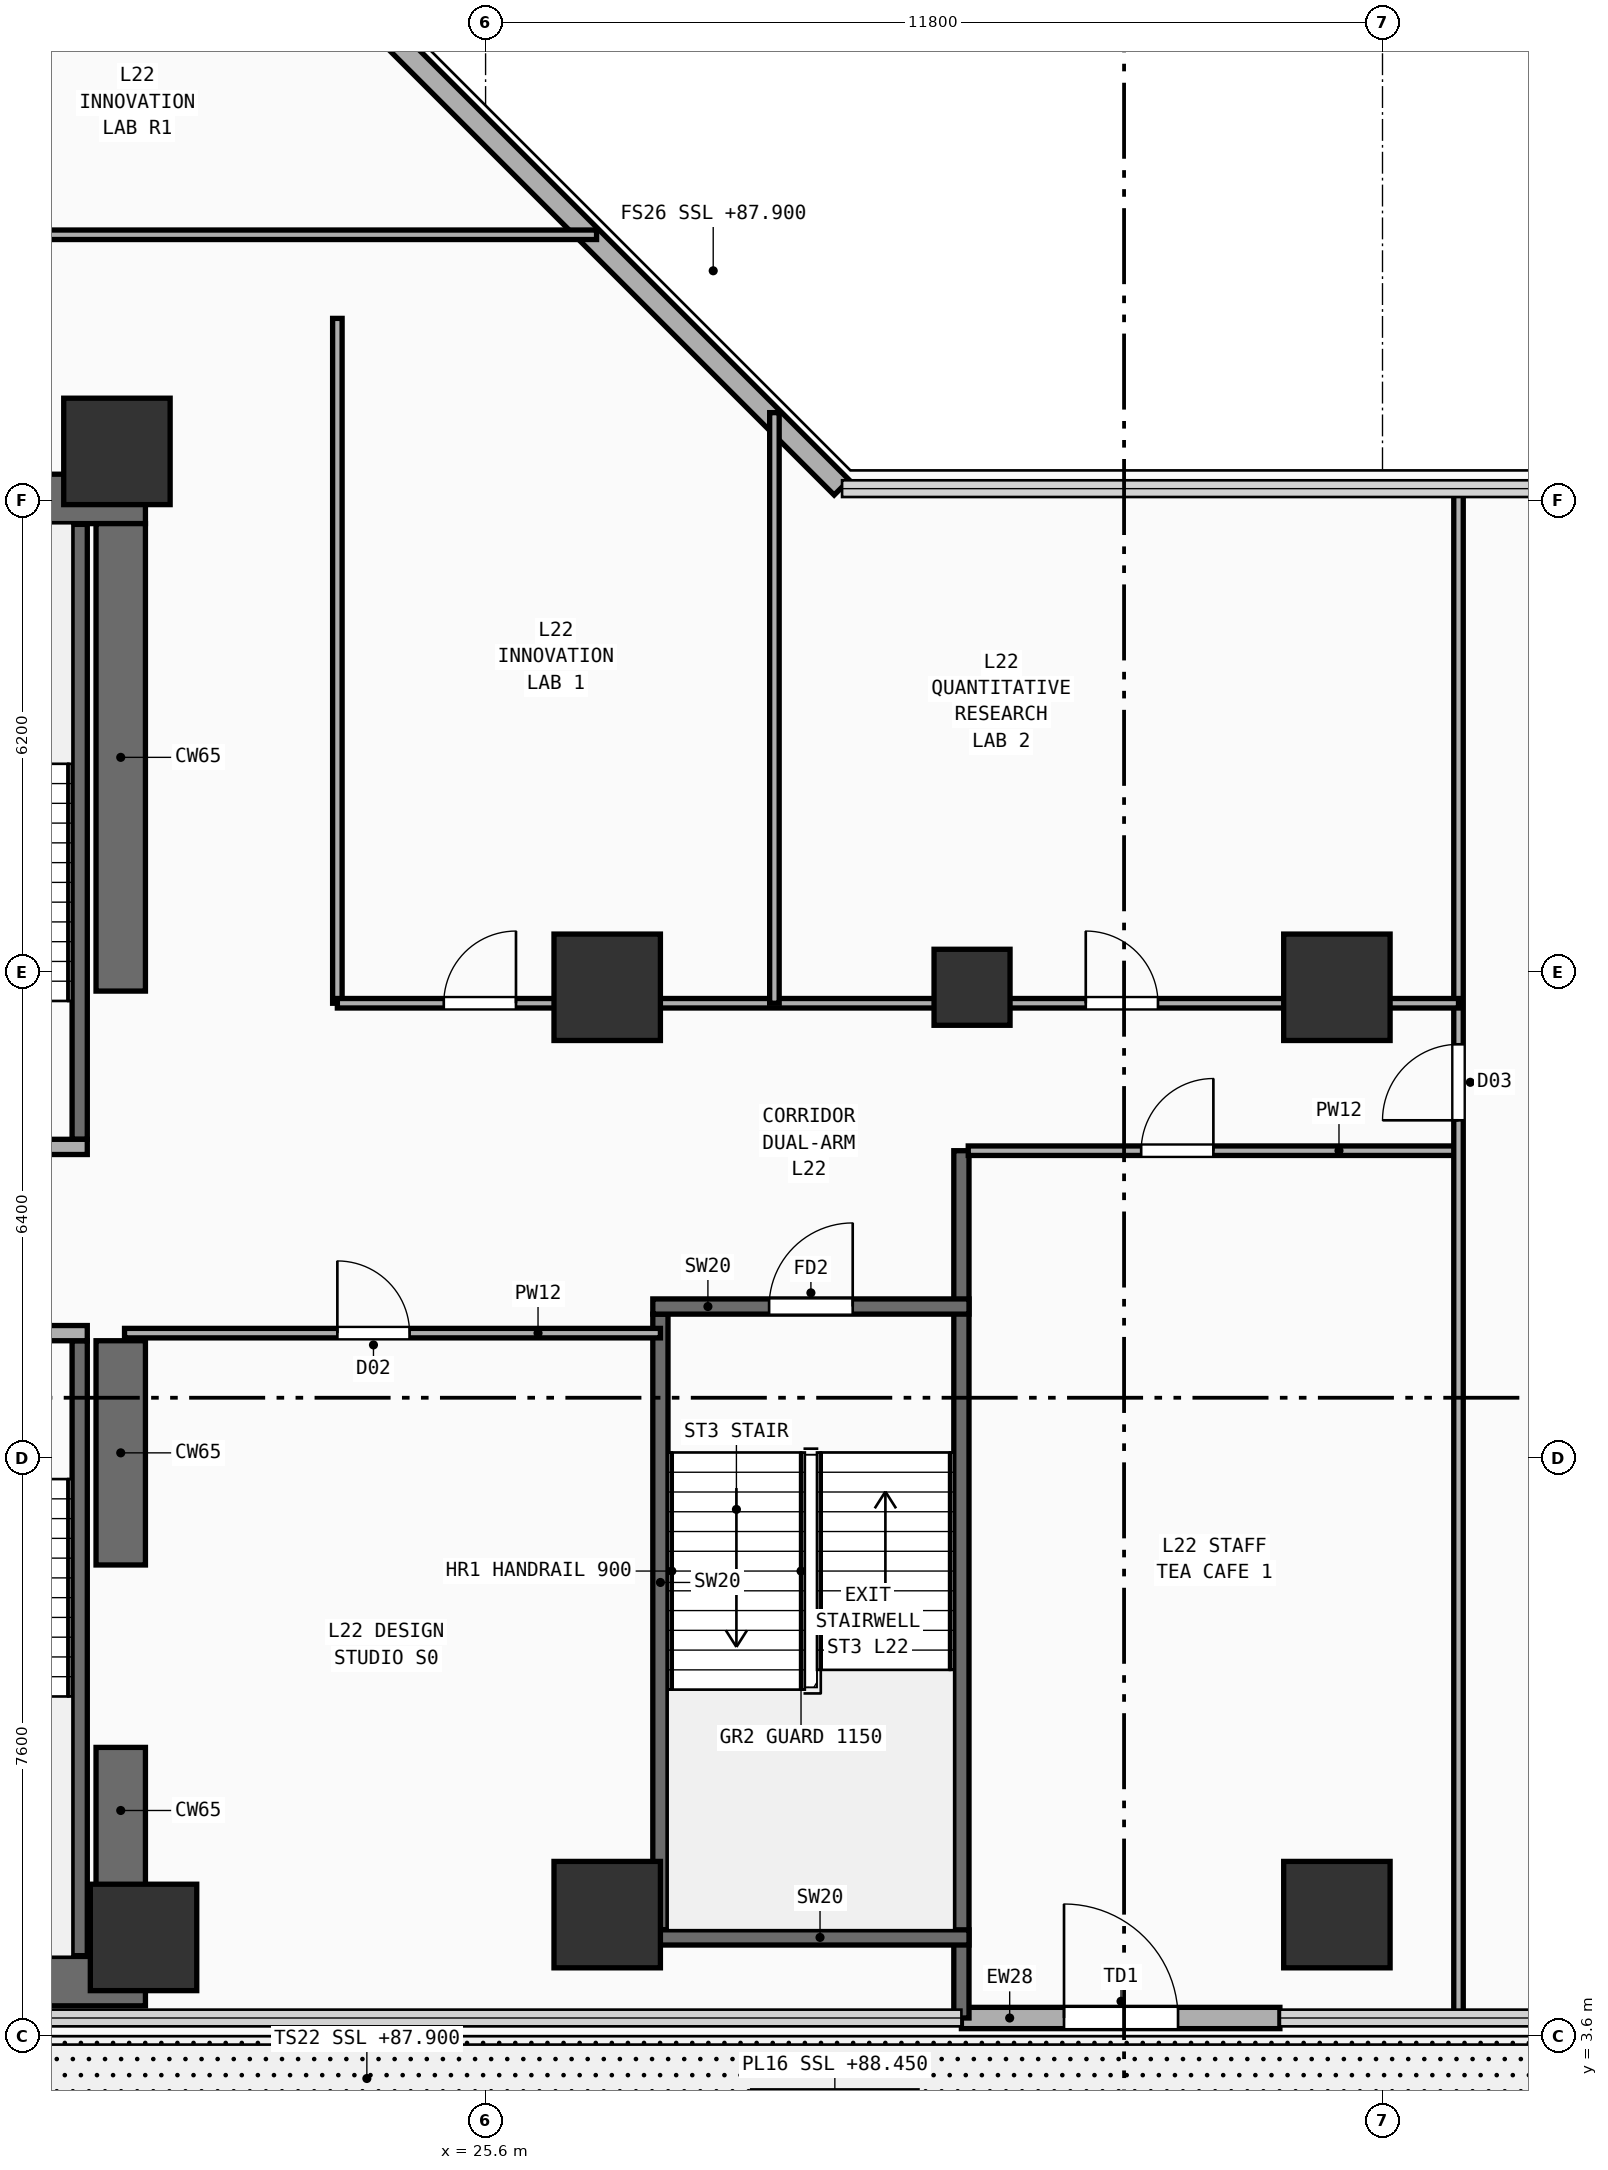
"""IFC4 building model, lengths in metres.
Left out: names, types, materials, properties, quantities, classifications, styles, units other than length and angle.
Written with IfcOpenShell. Run it as: python <this file> out.ifc"""

import sys

from ifc_helpers import new_model, si_unit, direction, frame, frame_2d, origin, origin_2d, place, context, subcontext, project, spatial, rectangle, extrude, element, fill, save


model = new_model("IFC4")
c1 = context("Model", 3, precision=1e-05, world=origin(), true_north=direction((0.0, 1.0)))
c2 = subcontext(c1, "Body", "Model", "MODEL_VIEW")
j1 = project(units=[si_unit("LENGTHUNIT", "METRE"), si_unit("PLANEANGLEUNIT", "RADIAN")], contexts=[c1])
p1 = place(None, origin())
s1 = spatial("IfcSite", under=j1, at=p1, CompositionType="ELEMENT")
p2 = place(p1, origin())
s2 = spatial("IfcBuilding", under=s1, at=p2, CompositionType="ELEMENT")
p3 = place(p2, frame((0.0, 0.0, 87.9)))
s3 = spatial("IfcBuildingStorey", under=s2, at=p3, CompositionType="ELEMENT", Elevation=87.9)
for number, where, z_axis, x_axis in (
    (1, (7.125, 4.325, 0.0), (0.0, 0.0, 1.0), (1.0, 0.0, 0.0)),
    (2, (7.125, 23.825, 0.0), (0.0, 0.0, 1.0), (1.0, 0.0, 0.0)),
):
    element("IfcWall", number, at=place(p3, frame(where, z_axis=z_axis, x_axis=x_axis)), inside=s3, PredefinedType="SHEAR", context=c2, shape_type="SweptSolid", body=[
        extrude(rectangle(XDim=14.0, YDim=0.65, at=frame_2d((7.0, 0.0))), origin(), (0.0, 0.0, 1.0), 3.54),
    ])
p4 = place(p3, frame((20.8, 4.65, 0.0), z_axis=(0.0, 0.0, 1.0), x_axis=(0.0, 1.0, 0.0)))
e3 = element("IfcWall", 3, at=p4, inside=s3, PredefinedType="SHEAR", context=c2, shape_type="SweptSolid", body=[
    extrude(rectangle(XDim=2.75, YDim=0.65, at=frame_2d((1.375, 0.0))), origin(), (0.0, 0.0, 1.0), 3.54),
])
p5 = place(p3, frame((20.8, 9.8, 0.0), z_axis=(0.0, 0.0, 1.0), x_axis=(0.0, 1.0, 0.0)))
e4 = element("IfcWall", 4, at=p5, inside=s3, PredefinedType="SHEAR", context=c2, shape_type="SweptSolid", body=[
    extrude(rectangle(XDim=2.95, YDim=0.65, at=frame_2d((1.475, 0.0))), origin(), (0.0, 0.0, 1.0), 3.54),
])
p6 = place(p3, frame((20.8, 17.35, 0.0), z_axis=(0.0, 0.0, 1.0), x_axis=(0.0, 1.0, 0.0)))
e5 = element("IfcWall", 5, at=p6, inside=s3, PredefinedType="SHEAR", context=c2, shape_type="SweptSolid", body=[
    extrude(rectangle(XDim=6.15, YDim=0.65, at=frame_2d((3.075, 0.0))), origin(), (0.0, 0.0, 1.0), 3.54),
])
for number, where, z_axis, x_axis in (
    (6, (21.1, 4.9, 0.0), (0.0, 0.0, 1.0), (1.0, 0.0, 0.0)),
    (7, (20.75, 24.45, 0.0), (0.0, 0.0, 1.0), (1.0, 0.0, 0.0)),
    (8, (27.2, 5.2, 0.0), (0.0, 0.0, 1.0), (1.0, 0.0, 0.0)),
    (9, (36.8, 5.2, 0.0), (0.0, 0.0, 1.0), (1.0, 0.0, 0.0)),
    (10, (27.2, 17.4, 0.0), (0.0, 0.0, 1.0), (1.0, 0.0, 0.0)),
    (11, (36.8, 17.4, 0.0), (0.0, 0.0, 1.0), (1.0, 0.0, 0.0)),
):
    element("IfcColumn", number, at=place(p3, frame(where, z_axis=z_axis, x_axis=x_axis)), inside=s3, PredefinedType="COLUMN", context=c2, shape_type="SweptSolid", body=[
        extrude(rectangle(XDim=1.4, YDim=1.4, at=origin_2d()), origin(), (0.0, 0.0, 1.0), 3.54),
    ])
p7 = place(p3, frame((32.0, 17.4, 0.0), z_axis=(0.0, 0.0, 1.0), x_axis=(1.0, 0.0, 0.0)))
e12 = element("IfcColumn", 12, at=p7, inside=s3, PredefinedType="COLUMN", context=c2, shape_type="SweptSolid", body=[
    extrude(rectangle(XDim=1.0, YDim=1.0, at=origin_2d()), origin(), (0.0, 0.0, 1.0), 3.54),
])
p8 = place(p3, frame((31.86, 3.84, 0.0), z_axis=(0.0, 0.0, 1.0), x_axis=(1.0, 0.0, 0.0)))
e13 = element("IfcWall", 13, at=p8, inside=s3, PredefinedType="SOLIDWALL", context=c2, shape_type="SweptSolid", body=[
    extrude(rectangle(XDim=4.19, YDim=0.28, at=frame_2d((2.095, 0.0))), origin(), (0.0, 0.0, 1.0), 3.54),
])
p9 = place(p8, frame((1.35, 0.0, 0.0)))
e14 = element("IfcOpeningElement", 14, at=p9, cuts=e13, PredefinedType="OPENING", context=c2, shape_type="SweptSolid", body=[
    extrude(rectangle(XDim=1.5, YDim=2.25, at=frame_2d((0.75, 1.125))), frame((0.0, 0.15, 0.0), z_axis=(0.0, -1.0, 0.0), x_axis=(1.0, 0.0, 0.0)), (0.0, 0.0, 1.0), 0.3),
])
p10 = place(p3, frame((30.285, 23.975, 0.0), z_axis=(0.0, 0.0, 1.0), x_axis=(-0.707106781187, 0.707106781187, 0.0)))
e15 = element("IfcWall", 15, at=p10, inside=s3, PredefinedType="SOLIDWALL", context=c2, shape_type="SweptSolid", body=[
    extrude(rectangle(XDim=9.207, YDim=0.28, at=frame_2d((4.603, 0.0))), origin(), (0.0, 0.0, 1.0), 3.54),
])
p11 = place(p3, frame((20.26, 4.66, 0.0), z_axis=(0.0, 0.0, 1.0), x_axis=(0.0, 1.0, 0.0)))
e16 = element("IfcWall", 16, at=p11, inside=s3, PredefinedType="SHEAR", context=c2, shape_type="SweptSolid", body=[
    extrude(rectangle(XDim=8.09, YDim=0.2, at=frame_2d((4.045, 0.0))), origin(), (0.0, 0.0, 1.0), 3.54),
])
p12 = place(p3, frame((16.4, 12.85, 0.0), z_axis=(0.0, 0.0, 1.0), x_axis=(1.0, 0.0, 0.0)))
e17 = element("IfcWall", 17, at=p12, inside=s3, PredefinedType="PARTITIONING", context=c2, shape_type="SweptSolid", body=[
    extrude(rectangle(XDim=3.96, YDim=0.2, at=frame_2d((1.98, 0.0))), origin(), (0.0, 0.0, 1.0), 3.54),
])
p13 = place(p12, frame((1.304, 0.0, 0.0)))
e18 = element("IfcOpeningElement", 18, at=p13, cuts=e17, PredefinedType="OPENING", context=c2, shape_type="SweptSolid", body=[
    extrude(rectangle(XDim=1.1, YDim=2.2, at=frame_2d((0.55, 1.1))), frame((0.0, 0.11, 0.0), z_axis=(0.0, -1.0, 0.0), x_axis=(1.0, 0.0, 0.0)), (0.0, 0.0, 1.0), 0.22),
])
p14 = place(p3, frame((20.26, 15.4, 0.0), z_axis=(0.0, 0.0, 1.0), x_axis=(0.0, 1.0, 0.0)))
e19 = element("IfcWall", 19, at=p14, inside=s3, PredefinedType="SHEAR", context=c2, shape_type="SweptSolid", body=[
    extrude(rectangle(XDim=8.09, YDim=0.2, at=frame_2d((4.045, 0.0))), origin(), (0.0, 0.0, 1.0), 3.54),
])
p15 = place(p3, frame((16.41, 15.3, 0.0), z_axis=(0.0, 0.0, 1.0), x_axis=(1.0, 0.0, 0.0)))
e20 = element("IfcWall", 20, at=p15, inside=s3, PredefinedType="PARTITIONING", context=c2, shape_type="SweptSolid", body=[
    extrude(rectangle(XDim=3.95, YDim=0.2, at=frame_2d((1.975, 0.0))), origin(), (0.0, 0.0, 1.0), 3.54),
])
p16 = place(p15, frame((1.294, 0.0, 0.0)))
e21 = element("IfcOpeningElement", 21, at=p16, cuts=e20, PredefinedType="OPENING", context=c2, shape_type="SweptSolid", body=[
    extrude(rectangle(XDim=1.1, YDim=2.2, at=frame_2d((0.55, 1.1))), frame((0.0, 0.11, 0.0), z_axis=(0.0, -1.0, 0.0), x_axis=(1.0, 0.0, 0.0)), (0.0, 0.0, 1.0), 0.22),
])
p17 = place(p3, frame((27.9, 5.0, 0.0), z_axis=(0.0, 0.0, 1.0), x_axis=(0.0, 1.0, 0.0)))
e22 = element("IfcWall", 22, at=p17, inside=s3, PredefinedType="SHEAR", context=c2, shape_type="SweptSolid", body=[
    extrude(rectangle(XDim=8.1, YDim=0.2, at=frame_2d((4.05, 0.0))), origin(), (0.0, 0.0, 1.0), 3.54),
])
p18 = place(p3, frame((31.86, 3.84, 0.0), z_axis=(0.0, 0.0, 1.0), x_axis=(0.0, 1.0, 0.0)))
e23 = element("IfcWall", 23, at=p18, inside=s3, PredefinedType="SHEAR", context=c2, shape_type="SweptSolid", body=[
    extrude(rectangle(XDim=11.41, YDim=0.2, at=frame_2d((5.705, 0.0))), origin(), (0.0, 0.0, 1.0), 3.54),
])
p19 = place(p3, frame((27.8, 4.9, 0.0), z_axis=(0.0, 0.0, 1.0), x_axis=(1.0, 0.0, 0.0)))
e24 = element("IfcWall", 24, at=p19, inside=s3, PredefinedType="SHEAR", context=c2, shape_type="SweptSolid", body=[
    extrude(rectangle(XDim=4.16, YDim=0.2, at=frame_2d((2.08, 0.0))), origin(), (0.0, 0.0, 1.0), 3.54),
])
p20 = place(p3, frame((27.8, 13.2, 0.0), z_axis=(0.0, 0.0, 1.0), x_axis=(1.0, 0.0, 0.0)))
e25 = element("IfcWall", 25, at=p20, inside=s3, PredefinedType="SHEAR", context=c2, shape_type="SweptSolid", body=[
    extrude(rectangle(XDim=4.16, YDim=0.2, at=frame_2d((2.08, 0.0))), origin(), (0.0, 0.0, 1.0), 3.54),
])
p21 = place(p20, frame((1.53, 0.0, 0.0)))
e26 = element("IfcOpeningElement", 26, at=p21, cuts=e25, PredefinedType="OPENING", context=c2, shape_type="SweptSolid", body=[
    extrude(rectangle(XDim=1.1, YDim=2.2, at=frame_2d((0.55, 1.1))), frame((0.0, 0.11, 0.0), z_axis=(0.0, -1.0, 0.0), x_axis=(1.0, 0.0, 0.0)), (0.0, 0.0, 1.0), 0.22),
])
p22 = place(p3, frame((20.85, 12.85, 0.0), z_axis=(0.0, 0.0, 1.0), x_axis=(1.0, 0.0, 0.0)))
e27 = element("IfcWall", 27, at=p22, inside=s3, PredefinedType="PARTITIONING", context=c2, shape_type="SweptSolid", body=[
    extrude(rectangle(XDim=7.05, YDim=0.125, at=frame_2d((3.525, 0.0))), origin(), (0.0, 0.0, 1.0), 3.54),
])
p23 = place(p22, frame((2.8, 0.0, 0.0)))
e28 = element("IfcOpeningElement", 28, at=p23, cuts=e27, PredefinedType="OPENING", context=c2, shape_type="SweptSolid", body=[
    extrude(rectangle(XDim=0.95, YDim=2.15, at=frame_2d((0.475, 1.075))), frame((0.0, 0.073, 0.0), z_axis=(0.0, -1.0, 0.0), x_axis=(1.0, 0.0, 0.0)), (0.0, 0.0, 1.0), 0.145),
])
p24 = place(p3, frame((31.95, 15.25, 0.0), z_axis=(0.0, 0.0, 1.0), x_axis=(1.0, 0.0, 0.0)))
e29 = element("IfcWall", 29, at=p24, inside=s3, PredefinedType="PARTITIONING", context=c2, shape_type="SweptSolid", body=[
    extrude(rectangle(XDim=6.45, YDim=0.125, at=frame_2d((3.225, 0.0))), origin(), (0.0, 0.0, 1.0), 3.09),
])
p25 = place(p24, frame((2.275, 0.0, 0.0)))
e30 = element("IfcOpeningElement", 30, at=p25, cuts=e29, PredefinedType="OPENING", context=c2, shape_type="SweptSolid", body=[
    extrude(rectangle(XDim=0.95, YDim=2.15, at=frame_2d((0.475, 1.075))), frame((0.0, 0.073, 0.0), z_axis=(0.0, -1.0, 0.0), x_axis=(1.0, 0.0, 0.0)), (0.0, 0.0, 1.0), 0.145),
])
p26 = place(p3, frame((38.4, 3.84, 0.0), z_axis=(0.0, 0.0, 1.0), x_axis=(0.0, 1.0, 0.0)))
e31 = element("IfcWall", 31, at=p26, inside=s3, PredefinedType="PARTITIONING", context=c2, shape_type="SweptSolid", body=[
    extrude(rectangle(XDim=20.12, YDim=0.125, at=frame_2d((10.06, 0.0))), origin(), (0.0, 0.0, 1.0), 3.54),
])
p27 = place(p26, frame((11.81, 0.0, 0.0)))
e32 = element("IfcOpeningElement", 32, at=p27, cuts=e31, PredefinedType="OPENING", context=c2, shape_type="SweptSolid", body=[
    extrude(rectangle(XDim=1.0, YDim=2.2, at=frame_2d((0.5, 1.1))), frame((0.0, 0.073, 0.0), z_axis=(0.0, -1.0, 0.0), x_axis=(1.0, 0.0, 0.0)), (0.0, 0.0, 1.0), 0.145),
])
p28 = place(p3, frame((23.65, 17.19, 0.0), z_axis=(0.0, 0.0, 1.0), x_axis=(0.0, 1.0, 0.0)))
e33 = element("IfcWall", 33, at=p28, inside=s3, PredefinedType="PARTITIONING", context=c2, shape_type="SweptSolid", body=[
    extrude(rectangle(XDim=9.01, YDim=0.125, at=frame_2d((4.505, 0.0))), origin(), (0.0, 0.0, 1.0), 3.54),
])
p29 = place(p3, frame((23.65, 17.19, 0.0), z_axis=(0.0, 0.0, 1.0), x_axis=(1.0, 0.0, 0.0)))
e34 = element("IfcWall", 34, at=p29, inside=s3, PredefinedType="PARTITIONING", context=c2, shape_type="SweptSolid", body=[
    extrude(rectangle(XDim=14.75, YDim=0.125, at=frame_2d((7.375, 0.0))), origin(), (0.0, 0.0, 1.0), 3.24),
])
p30 = place(p29, frame((1.4, 0.0, 0.0)))
e35 = element("IfcOpeningElement", 35, at=p30, cuts=e34, PredefinedType="OPENING", context=c2, shape_type="SweptSolid", body=[
    extrude(rectangle(XDim=0.95, YDim=2.15, at=frame_2d((0.475, 1.075))), frame((0.0, 0.073, 0.0), z_axis=(0.0, -1.0, 0.0), x_axis=(1.0, 0.0, 0.0)), (0.0, 0.0, 1.0), 0.145),
])
p31 = place(p29, frame((9.846, 0.0, 0.0)))
e36 = element("IfcOpeningElement", 36, at=p31, cuts=e34, PredefinedType="OPENING", context=c2, shape_type="SweptSolid", body=[
    extrude(rectangle(XDim=0.95, YDim=2.15, at=frame_2d((0.475, 1.075))), frame((0.0, 0.073, 0.0), z_axis=(0.0, -1.0, 0.0), x_axis=(1.0, 0.0, 0.0)), (0.0, 0.0, 1.0), 0.145),
])
p32 = place(p3, frame((29.4, 17.19, 0.0), z_axis=(0.0, 0.0, 1.0), x_axis=(0.0, 1.0, 0.0)))
e37 = element("IfcWall", 37, at=p32, inside=s3, PredefinedType="PARTITIONING", context=c2, shape_type="SweptSolid", body=[
    extrude(rectangle(XDim=7.77, YDim=0.125, at=frame_2d((3.885, 0.0))), origin(), (0.0, 0.0, 1.0), 3.54),
])
p33 = place(p3, frame((15.54, 27.3, 0.0), z_axis=(0.0, 0.0, 1.0), x_axis=(1.0, 0.0, 0.0)))
e38 = element("IfcWall", 38, at=p33, inside=s3, PredefinedType="PARTITIONING", context=c2, shape_type="SweptSolid", body=[
    extrude(rectangle(XDim=11.52, YDim=0.125, at=frame_2d((5.76, 0.0))), origin(), (0.0, 0.0, 1.0), 3.54),
])
p34 = place(p9, frame((1.5, 0.0, 0.0), z_axis=(0.0, 0.0, 1.0), x_axis=(-1.0, 0.0, 0.0)))
e39 = element("IfcDoor", 39, at=p34, inside=s3, OperationType="SINGLE_SWING_RIGHT", PredefinedType="DOOR", context=c2, shape_type="SweptSolid", body=[
    extrude(rectangle(XDim=1.5, YDim=2.25, at=frame_2d((0.75, 1.125))), frame((0.0, 0.025, 0.0), z_axis=(0.0, -1.0, 0.0), x_axis=(1.0, 0.0, 0.0)), (0.0, 0.0, 1.0), 0.05),
])
fill(e14, e39)
p35 = place(p21, frame((1.1, 0.0, 0.0), z_axis=(0.0, 0.0, 1.0), x_axis=(-1.0, 0.0, 0.0)))
e40 = element("IfcDoor", 40, at=p35, inside=s3, OperationType="SINGLE_SWING_LEFT", PredefinedType="DOOR", context=c2, shape_type="SweptSolid", body=[
    extrude(rectangle(XDim=1.1, YDim=2.2, at=frame_2d((0.55, 1.1))), frame((0.0, 0.025, 0.0), z_axis=(0.0, -1.0, 0.0), x_axis=(1.0, 0.0, 0.0)), (0.0, 0.0, 1.0), 0.05),
])
fill(e26, e40)
p36 = place(p23, origin())
e41 = element("IfcDoor", 41, at=p36, inside=s3, OperationType="SINGLE_SWING_LEFT", PredefinedType="DOOR", context=c2, shape_type="SweptSolid", body=[
    extrude(rectangle(XDim=0.95, YDim=2.15, at=frame_2d((0.475, 1.075))), frame((0.0, 0.025, 0.0), z_axis=(0.0, -1.0, 0.0), x_axis=(1.0, 0.0, 0.0)), (0.0, 0.0, 1.0), 0.05),
])
fill(e28, e41)
p37 = place(p25, origin())
e42 = element("IfcDoor", 42, at=p37, inside=s3, OperationType="SINGLE_SWING_RIGHT", PredefinedType="DOOR", context=c2, shape_type="SweptSolid", body=[
    extrude(rectangle(XDim=0.95, YDim=2.15, at=frame_2d((0.475, 1.075))), frame((0.0, 0.025, 0.0), z_axis=(0.0, -1.0, 0.0), x_axis=(1.0, 0.0, 0.0)), (0.0, 0.0, 1.0), 0.05),
])
fill(e30, e42)
p38 = place(p27, origin())
e43 = element("IfcDoor", 43, at=p38, inside=s3, OperationType="SINGLE_SWING_LEFT", PredefinedType="DOOR", context=c2, shape_type="SweptSolid", body=[
    extrude(rectangle(XDim=1.0, YDim=2.2, at=frame_2d((0.5, 1.1))), frame((0.0, 0.025, 0.0), z_axis=(0.0, -1.0, 0.0), x_axis=(1.0, 0.0, 0.0)), (0.0, 0.0, 1.0), 0.05),
])
fill(e32, e43)
p39 = place(p30, origin())
e44 = element("IfcDoor", 44, at=p39, inside=s3, OperationType="SINGLE_SWING_RIGHT", PredefinedType="DOOR", context=c2, shape_type="SweptSolid", body=[
    extrude(rectangle(XDim=0.95, YDim=2.15, at=frame_2d((0.475, 1.075))), frame((0.0, 0.025, 0.0), z_axis=(0.0, -1.0, 0.0), x_axis=(1.0, 0.0, 0.0)), (0.0, 0.0, 1.0), 0.05),
])
fill(e35, e44)
p40 = place(p31, origin())
e45 = element("IfcDoor", 45, at=p40, inside=s3, OperationType="SINGLE_SWING_LEFT", PredefinedType="DOOR", context=c2, shape_type="SweptSolid", body=[
    extrude(rectangle(XDim=0.95, YDim=2.15, at=frame_2d((0.475, 1.075))), frame((0.0, 0.025, 0.0), z_axis=(0.0, -1.0, 0.0), x_axis=(1.0, 0.0, 0.0)), (0.0, 0.0, 1.0), 0.05),
])
fill(e36, e45)
save(model, sys.argv[1])
